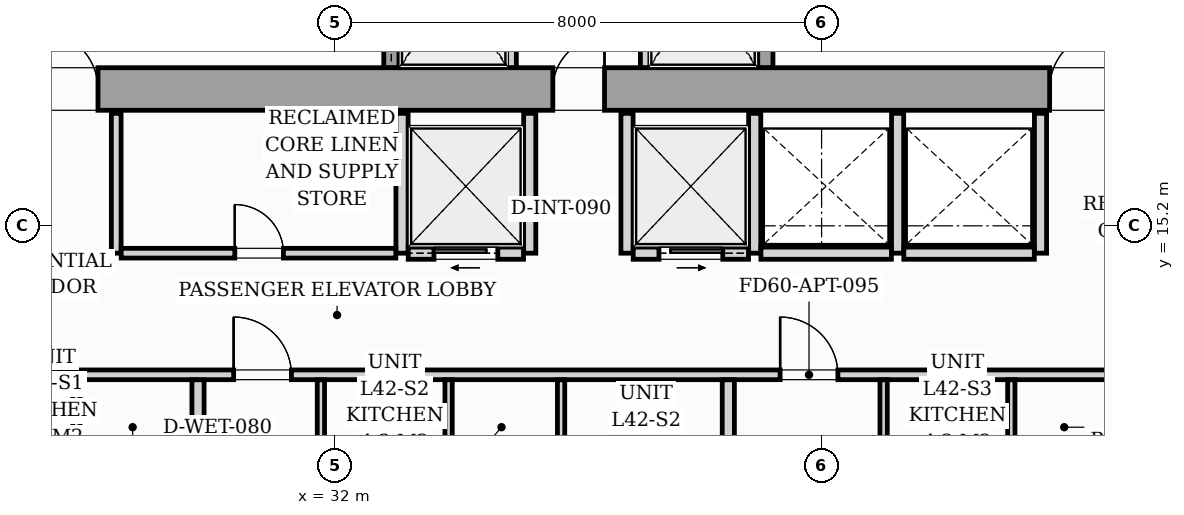
"""IFC4 building model, lengths in metres.
Left out: names, types, materials, properties, quantities, classifications, styles, units other than length and angle.
Written with IfcOpenShell. Run it as: python <this file> out.ifc"""

import sys

from ifc_helpers import new_model, si_unit, direction, frame, frame_2d, origin, origin_2d, place, context, subcontext, project, spatial, rectangle, i_section, extrude, source, transform, mapped, element, fill, save


model = new_model("IFC4")
c1 = context("Model", 3, precision=1e-05, world=origin(), true_north=direction((0.0, 1.0)))
c2 = subcontext(c1, "Body", "Model", "MODEL_VIEW")
j1 = project(units=[si_unit("LENGTHUNIT", "METRE"), si_unit("PLANEANGLEUNIT", "RADIAN")], contexts=[c1])
p1 = place(None, origin())
s1 = spatial("IfcSite", under=j1, at=p1, CompositionType="ELEMENT")
p2 = place(p1, origin())
s2 = spatial("IfcBuilding", under=s1, at=p2, CompositionType="ELEMENT")
p3 = place(p2, frame((0.0, 0.0, 147.0)))
s3 = spatial("IfcBuildingStorey", under=s2, at=p3, CompositionType="ELEMENT", Elevation=147.0)
m1 = source(origin(), c2, "Body", "SweptSolid", [
    extrude(i_section(OverallWidth=0.421, OverallDepth=0.465, WebThickness=0.045, FlangeThickness=0.073, FilletRadius=0.018, at=origin_2d()), origin(), (0.0, 0.0, 1.0), 3.196),
])
for number, where, z_axis, x_axis in (
    (1, (33.12, 17.4, 0.002), (0.0, 0.0, 1.0), (1.0, 0.0, 0.0)),
    (2, (38.88, 17.4, 0.002), (0.0, 0.0, 1.0), (1.0, 0.0, 0.0)),
):
    element("IfcColumn", number, at=place(p3, frame(where, z_axis=z_axis, x_axis=x_axis)), inside=s3, PredefinedType="PILASTER", context=c2, shape_type="MappedRepresentation", body=[
        mapped(m1, transform((0.0, 0.0, 0.0), scale=1.0)),
    ])
p4 = place(p3, frame((26.1, 17.45, 0.0), z_axis=(0.0, 0.0, 1.0), x_axis=(1.0, 0.0, 0.0)))
e3 = element("IfcWall", 3, at=p4, inside=s3, PredefinedType="SHEAR", context=c2, shape_type="SweptSolid", body=[
    extrude(rectangle(XDim=19.8, YDim=0.7, at=frame_2d((9.9, 0.0))), origin(), (0.0, 0.0, 1.0), 3.2),
])
p5 = place(p4, frame((1.05, 0.0, 0.0)))
e4 = element("IfcOpeningElement", 4, at=p5, cuts=e3, PredefinedType="OPENING", context=c2, shape_type="SweptSolid", body=[
    extrude(rectangle(XDim=0.95, YDim=2.06, at=frame_2d((0.475, 1.03))), frame((0.0, 0.36, 0.0), z_axis=(0.0, -1.0, 0.0), x_axis=(1.0, 0.0, 0.0)), (0.0, 0.0, 1.0), 0.72),
])
p6 = place(p4, frame((9.48, 0.0, 0.0)))
e5 = element("IfcOpeningElement", 5, at=p6, cuts=e3, PredefinedType="OPENING", context=c2, shape_type="SweptSolid", body=[
    extrude(rectangle(XDim=0.85, YDim=2.0, at=frame_2d((0.425, 1.0))), frame((0.0, 0.36, 0.0), z_axis=(0.0, -1.0, 0.0), x_axis=(1.0, 0.0, 0.0)), (0.0, 0.0, 1.0), 0.72),
])
p7 = place(p4, frame((17.65, 0.0, 0.0)))
e6 = element("IfcOpeningElement", 6, at=p7, cuts=e3, PredefinedType="OPENING", context=c2, shape_type="SweptSolid", body=[
    extrude(rectangle(XDim=0.95, YDim=2.06, at=frame_2d((0.475, 1.03))), frame((0.0, 0.36, 0.0), z_axis=(0.0, -1.0, 0.0), x_axis=(1.0, 0.0, 0.0)), (0.0, 0.0, 1.0), 0.72),
])
p8 = place(p3, frame((32.925, 17.802, 0.0), z_axis=(0.0, 0.0, 1.0), x_axis=(0.0, 1.0, 0.0)))
e7 = element("IfcWall", 7, at=p8, inside=s3, PredefinedType="SOLIDWALL", context=c2, shape_type="SweptSolid", body=[
    extrude(rectangle(XDim=2.646, YDim=0.25, at=frame_2d((1.323, 0.0))), origin(), (0.0, 0.0, 1.0), 3.2),
])
p9 = place(p8, frame((0.598, 0.0, 0.0)))
e8 = element("IfcOpeningElement", 8, at=p9, cuts=e7, PredefinedType="OPENING", context=c2, shape_type="SweptSolid", body=[
    extrude(rectangle(XDim=1.1, YDim=2.08, at=frame_2d((0.55, 1.04))), frame((0.0, 0.135, 0.0), z_axis=(0.0, -1.0, 0.0), x_axis=(1.0, 0.0, 0.0)), (0.0, 0.0, 1.0), 0.27),
])
for number, where, z_axis, x_axis in (
    (9, (34.9, 17.802, 0.0), (0.0, 0.0, 1.0), (0.0, 1.0, 0.0)),
    (10, (37.1, 17.802, 0.0), (0.0, 0.0, 1.0), (0.0, 1.0, 0.0)),
):
    element("IfcWall", number, at=place(p3, frame(where, z_axis=z_axis, x_axis=x_axis)), inside=s3, PredefinedType="PARTITIONING", context=c2, shape_type="SweptSolid", body=[
        extrude(rectangle(XDim=2.646, YDim=0.16, at=frame_2d((1.323, 0.0))), origin(), (0.0, 0.0, 1.0), 2.94),
    ])
p10 = place(p3, frame((39.075, 17.802, 0.0), z_axis=(0.0, 0.0, 1.0), x_axis=(0.0, 1.0, 0.0)))
e11 = element("IfcWall", 11, at=p10, inside=s3, PredefinedType="SOLIDWALL", context=c2, shape_type="SweptSolid", body=[
    extrude(rectangle(XDim=2.646, YDim=0.25, at=frame_2d((1.323, 0.0))), origin(), (0.0, 0.0, 1.0), 3.2),
])
p11 = place(p10, frame((0.598, 0.0, 0.0)))
e12 = element("IfcOpeningElement", 12, at=p11, cuts=e11, PredefinedType="OPENING", context=c2, shape_type="SweptSolid", body=[
    extrude(rectangle(XDim=1.1, YDim=2.08, at=frame_2d((0.55, 1.04))), frame((0.0, 0.135, 0.0), z_axis=(0.0, -1.0, 0.0), x_axis=(1.0, 0.0, 0.0)), (0.0, 0.0, 1.0), 0.27),
])
p12 = place(p3, frame((28.4, 14.75, 0.0), z_axis=(0.0, 0.0, 1.0), x_axis=(0.0, 1.0, 0.0)))
e13 = element("IfcWall", 13, at=p12, inside=s3, PredefinedType="PARTITIONING", context=c2, shape_type="SweptSolid", body=[
    extrude(rectangle(XDim=2.3, YDim=0.16, at=frame_2d((1.15, 0.0))), origin(), (0.0, 0.0, 1.0), 2.94),
])
p13 = place(p3, frame((33.1, 14.75, 0.0), z_axis=(0.0, 0.0, 1.0), x_axis=(0.0, 1.0, 0.0)))
e14 = element("IfcWall", 14, at=p13, inside=s3, PredefinedType="PARTITIONING", context=c2, shape_type="SweptSolid", body=[
    extrude(rectangle(XDim=2.3, YDim=0.2, at=frame_2d((1.15, 0.0))), origin(), (0.0, 0.0, 1.0), 2.94),
])
p14 = place(p3, frame((28.482, 14.75, 0.0), z_axis=(0.0, 0.0, 1.0), x_axis=(1.0, 0.0, 0.0)))
e15 = element("IfcWall", 15, at=p14, inside=s3, PredefinedType="PARTITIONING", context=c2, shape_type="SweptSolid", body=[
    extrude(rectangle(XDim=4.516, YDim=0.16, at=frame_2d((2.258, 0.0))), origin(), (0.0, 0.0, 1.0), 2.94),
])
p15 = place(p14, frame((1.868, 0.0, 0.0)))
e16 = element("IfcOpeningElement", 16, at=p15, cuts=e15, PredefinedType="OPENING", context=c2, shape_type="SweptSolid", body=[
    extrude(rectangle(XDim=0.8, YDim=2.05, at=frame_2d((0.4, 1.025))), frame((0.0, 0.09, 0.0), z_axis=(0.0, -1.0, 0.0), x_axis=(1.0, 0.0, 0.0)), (0.0, 0.0, 1.0), 0.18),
])
p16 = place(p3, frame((35.2, 14.75, 0.0), z_axis=(0.0, 0.0, 1.0), x_axis=(0.0, 1.0, 0.0)))
e17 = element("IfcWall", 17, at=p16, inside=s3, PredefinedType="PARTITIONING", context=c2, shape_type="SweptSolid", body=[
    extrude(rectangle(XDim=2.3, YDim=0.2, at=frame_2d((1.15, 0.0))), origin(), (0.0, 0.0, 1.0), 2.94),
])
p17 = place(p3, frame((33.202, 14.75, 0.0), z_axis=(0.0, 0.0, 1.0), x_axis=(1.0, 0.0, 0.0)))
e18 = element("IfcWall", 18, at=p17, inside=s3, PredefinedType="PARTITIONING", context=c2, shape_type="SweptSolid", body=[
    extrude(rectangle(XDim=1.896, YDim=0.2, at=frame_2d((0.948, 0.0))), origin(), (0.0, 0.0, 1.0), 2.94),
])
p18 = place(p17, frame((0.423, 0.0, 0.0)))
e19 = element("IfcOpeningElement", 19, at=p18, cuts=e18, PredefinedType="OPENING", context=c2, shape_type="SweptSolid", body=[
    extrude(rectangle(XDim=1.05, YDim=2.08, at=frame_2d((0.525, 1.04))), frame((0.0, 0.11, 0.0), z_axis=(0.0, -1.0, 0.0), x_axis=(1.0, 0.0, 0.0)), (0.0, 0.0, 1.0), 0.22),
])
for number, where, z_axis, x_axis in (
    (20, (36.8, 14.75, 0.0), (0.0, 0.0, 1.0), (0.0, 1.0, 0.0)),
    (21, (38.9, 14.75, 0.0), (0.0, 0.0, 1.0), (0.0, 1.0, 0.0)),
):
    element("IfcWall", number, at=place(p3, frame(where, z_axis=z_axis, x_axis=x_axis)), inside=s3, PredefinedType="PARTITIONING", context=c2, shape_type="SweptSolid", body=[
        extrude(rectangle(XDim=2.3, YDim=0.2, at=frame_2d((1.15, 0.0))), origin(), (0.0, 0.0, 1.0), 2.94),
    ])
p19 = place(p3, frame((36.902, 14.75, 0.0), z_axis=(0.0, 0.0, 1.0), x_axis=(1.0, 0.0, 0.0)))
e22 = element("IfcWall", 22, at=p19, inside=s3, PredefinedType="PARTITIONING", context=c2, shape_type="SweptSolid", body=[
    extrude(rectangle(XDim=1.896, YDim=0.2, at=frame_2d((0.948, 0.0))), origin(), (0.0, 0.0, 1.0), 2.94),
])
p20 = place(p19, frame((0.423, 0.0, 0.0)))
e23 = element("IfcOpeningElement", 23, at=p20, cuts=e22, PredefinedType="OPENING", context=c2, shape_type="SweptSolid", body=[
    extrude(rectangle(XDim=1.05, YDim=2.08, at=frame_2d((0.525, 1.04))), frame((0.0, 0.11, 0.0), z_axis=(0.0, -1.0, 0.0), x_axis=(1.0, 0.0, 0.0)), (0.0, 0.0, 1.0), 0.22),
])
for number, where, z_axis, x_axis in (
    (24, (41.25, 14.75, 0.0), (0.0, 0.0, 1.0), (0.0, 1.0, 0.0)),
    (25, (43.6, 14.75, 0.0), (0.0, 0.0, 1.0), (0.0, 1.0, 0.0)),
):
    element("IfcWall", number, at=place(p3, frame(where, z_axis=z_axis, x_axis=x_axis)), inside=s3, PredefinedType="PARTITIONING", context=c2, shape_type="SweptSolid", body=[
        extrude(rectangle(XDim=2.3, YDim=0.2, at=frame_2d((1.15, 0.0))), origin(), (0.0, 0.0, 1.0), 2.94),
    ])
for number, where, z_axis, x_axis in (
    (26, (39.002, 14.75, 0.0), (0.0, 0.0, 1.0), (1.0, 0.0, 0.0)),
    (27, (41.352, 14.75, 0.0), (0.0, 0.0, 1.0), (1.0, 0.0, 0.0)),
):
    element("IfcWall", number, at=place(p3, frame(where, z_axis=z_axis, x_axis=x_axis)), inside=s3, PredefinedType="PARTITIONING", context=c2, shape_type="SweptSolid", body=[
        extrude(rectangle(XDim=2.146, YDim=0.2, at=frame_2d((1.073, 0.0))), origin(), (0.0, 0.0, 1.0), 2.94),
    ])
p21 = place(p3, frame((22.05, 12.75, 0.0), z_axis=(0.0, 0.0, 1.0), x_axis=(1.0, 0.0, 0.0)))
e28 = element("IfcWall", 28, at=p21, inside=s3, PredefinedType="PARTITIONING", context=c2, shape_type="SweptSolid", body=[
    extrude(rectangle(XDim=25.65, YDim=0.16, at=frame_2d((12.825, 0.0))), origin(), (0.0, 0.0, 1.0), 2.94),
])
p22 = place(p21, frame((1.312, 0.0, 0.0)))
e29 = element("IfcOpeningElement", 29, at=p22, cuts=e28, PredefinedType="OPENING", context=c2, shape_type="SweptSolid", body=[
    extrude(rectangle(XDim=0.95, YDim=2.06, at=frame_2d((0.475, 1.03))), frame((0.0, 0.09, 0.0), z_axis=(0.0, -1.0, 0.0), x_axis=(1.0, 0.0, 0.0)), (0.0, 0.0, 1.0), 0.18),
])
p23 = place(p21, frame((8.281, 0.0, 0.0)))
e30 = element("IfcOpeningElement", 30, at=p23, cuts=e28, PredefinedType="OPENING", context=c2, shape_type="SweptSolid", body=[
    extrude(rectangle(XDim=0.95, YDim=2.06, at=frame_2d((0.475, 1.03))), frame((0.0, 0.09, 0.0), z_axis=(0.0, -1.0, 0.0), x_axis=(1.0, 0.0, 0.0)), (0.0, 0.0, 1.0), 0.18),
])
p24 = place(p21, frame((17.268, 0.0, 0.0)))
e31 = element("IfcOpeningElement", 31, at=p24, cuts=e28, PredefinedType="OPENING", context=c2, shape_type="SweptSolid", body=[
    extrude(rectangle(XDim=0.95, YDim=2.06, at=frame_2d((0.475, 1.03))), frame((0.0, 0.09, 0.0), z_axis=(0.0, -1.0, 0.0), x_axis=(1.0, 0.0, 0.0)), (0.0, 0.0, 1.0), 0.18),
])
p25 = place(p3, frame((27.745, 10.562, 0.0), z_axis=(0.0, 0.0, 1.0), x_axis=(0.0, 1.0, 0.0)))
e32 = element("IfcWall", 32, at=p25, inside=s3, PredefinedType="PARTITIONING", context=c2, shape_type="SweptSolid", body=[
    extrude(rectangle(XDim=2.106, YDim=0.12, at=frame_2d((1.053, 0.0))), origin(), (0.0, 0.0, 1.0), 2.94),
])
p26 = place(p3, frame((29.745, 10.562, 0.0), z_axis=(0.0, 0.0, 1.0), x_axis=(0.0, 1.0, 0.0)))
e33 = element("IfcWall", 33, at=p26, inside=s3, PredefinedType="PARTITIONING", context=c2, shape_type="SweptSolid", body=[
    extrude(rectangle(XDim=2.106, YDim=0.2, at=frame_2d((1.053, 0.0))), origin(), (0.0, 0.0, 1.0), 2.94),
])
p27 = place(p3, frame((35.716, 6.754, 0.0), z_axis=(0.0, 0.0, 1.0), x_axis=(0.0, 1.0, 0.0)))
e34 = element("IfcWall", 34, at=p27, inside=s3, PredefinedType="PARTITIONING", context=c2, shape_type="SweptSolid", body=[
    extrude(rectangle(XDim=5.914, YDim=0.12, at=frame_2d((2.957, 0.0))), origin(), (0.0, 0.0, 1.0), 2.94),
])
p28 = place(p27, frame((2.646, 0.0, 0.0)))
e35 = element("IfcOpeningElement", 35, at=p28, cuts=e34, PredefinedType="OPENING", context=c2, shape_type="SweptSolid", body=[
    extrude(rectangle(XDim=0.9, YDim=2.05, at=frame_2d((0.45, 1.025))), frame((0.0, 0.07, 0.0), z_axis=(0.0, -1.0, 0.0), x_axis=(1.0, 0.0, 0.0)), (0.0, 0.0, 1.0), 0.14),
])
for number, where, z_axis, x_axis in (
    (36, (33.866, 10.562, 0.0), (0.0, 0.0, 1.0), (0.0, 1.0, 0.0)),
    (37, (31.766, 10.562, 0.0), (0.0, 0.0, 1.0), (0.0, 1.0, 0.0)),
):
    element("IfcWall", number, at=place(p3, frame(where, z_axis=z_axis, x_axis=x_axis)), inside=s3, PredefinedType="PARTITIONING", context=c2, shape_type="SweptSolid", body=[
        extrude(rectangle(XDim=2.106, YDim=0.12, at=frame_2d((1.053, 0.0))), origin(), (0.0, 0.0, 1.0), 2.94),
    ])
p29 = place(p3, frame((38.466, 6.49, 0.0), z_axis=(0.0, 0.0, 1.0), x_axis=(0.0, 1.0, 0.0)))
e38 = element("IfcWall", 38, at=p29, inside=s3, PredefinedType="PARTITIONING", context=c2, shape_type="SweptSolid", body=[
    extrude(rectangle(XDim=6.178, YDim=0.2, at=frame_2d((3.089, 0.0))), origin(), (0.0, 0.0, 1.0), 2.94),
])
for number, where, z_axis, x_axis in (
    (39, (43.12, 10.562, 0.0), (0.0, 0.0, 1.0), (0.0, 1.0, 0.0)),
    (40, (41.02, 10.562, 0.0), (0.0, 0.0, 1.0), (0.0, 1.0, 0.0)),
):
    element("IfcWall", number, at=place(p3, frame(where, z_axis=z_axis, x_axis=x_axis)), inside=s3, PredefinedType="PARTITIONING", context=c2, shape_type="SweptSolid", body=[
        extrude(rectangle(XDim=2.106, YDim=0.12, at=frame_2d((1.053, 0.0))), origin(), (0.0, 0.0, 1.0), 2.94),
    ])
m2 = source(origin(), c2, "Body", "SweptSolid", [
    extrude(rectangle(XDim=0.95, YDim=2.06, at=frame_2d((0.475, 1.03))), frame((0.0, 0.025, 0.0), z_axis=(0.0, -1.0, 0.0), x_axis=(1.0, 0.0, 0.0)), (0.0, 0.0, 1.0), 0.05),
])
p30 = place(p5, origin())
e41 = element("IfcDoor", 41, at=p30, inside=s3, OperationType="SINGLE_SWING_LEFT", PredefinedType="DOOR", context=c2, shape_type="MappedRepresentation", body=[
    mapped(m2, transform((0.0, 0.0, 0.0), scale=1.0)),
])
fill(e4, e41)
m3 = source(origin(), c2, "Body", "SweptSolid", [
    extrude(rectangle(XDim=0.85, YDim=2.0, at=frame_2d((0.425, 1.0))), frame((0.0, 0.025, 0.0), z_axis=(0.0, -1.0, 0.0), x_axis=(1.0, 0.0, 0.0)), (0.0, 0.0, 1.0), 0.05),
])
p31 = place(p6, origin())
e42 = element("IfcDoor", 42, at=p31, inside=s3, OperationType="SINGLE_SWING_RIGHT", PredefinedType="DOOR", context=c2, shape_type="MappedRepresentation", body=[
    mapped(m3, transform((0.0, 0.0, 0.0), scale=1.0)),
])
fill(e5, e42)
p32 = place(p7, origin())
e43 = element("IfcDoor", 43, at=p32, inside=s3, OperationType="SINGLE_SWING_RIGHT", PredefinedType="DOOR", context=c2, shape_type="MappedRepresentation", body=[
    mapped(m2, transform((0.0, 0.0, 0.0), scale=1.0)),
])
fill(e6, e43)
m4 = source(origin(), c2, "Body", "SweptSolid", [
    extrude(rectangle(XDim=0.8, YDim=2.05, at=frame_2d((0.4, 1.025))), frame((0.0, 0.025, 0.0), z_axis=(0.0, -1.0, 0.0), x_axis=(1.0, 0.0, 0.0)), (0.0, 0.0, 1.0), 0.05),
])
p33 = place(p15, origin())
e44 = element("IfcDoor", 44, at=p33, inside=s3, OperationType="SINGLE_SWING_LEFT", PredefinedType="DOOR", context=c2, shape_type="MappedRepresentation", body=[
    mapped(m4, transform((0.0, 0.0, 0.0), scale=1.0)),
])
fill(e16, e44)
m5 = source(origin(), c2, "Body", "SweptSolid", [
    extrude(rectangle(XDim=1.05, YDim=2.08, at=frame_2d((0.525, 1.04))), frame((0.0, 0.025, 0.0), z_axis=(0.0, -1.0, 0.0), x_axis=(1.0, 0.0, 0.0)), (0.0, 0.0, 1.0), 0.05),
])
p34 = place(p18, origin())
e45 = element("IfcDoor", 45, at=p34, inside=s3, OperationType="SLIDING_TO_LEFT", PredefinedType="DOOR", context=c2, shape_type="MappedRepresentation", body=[
    mapped(m5, transform((0.0, 0.0, 0.0), scale=1.0)),
])
fill(e19, e45)
p35 = place(p20, origin())
e46 = element("IfcDoor", 46, at=p35, inside=s3, OperationType="SLIDING_TO_RIGHT", PredefinedType="DOOR", context=c2, shape_type="MappedRepresentation", body=[
    mapped(m5, transform((0.0, 0.0, 0.0), scale=1.0)),
])
fill(e23, e46)
m6 = source(origin(), c2, "Body", "SweptSolid", [
    extrude(rectangle(XDim=0.95, YDim=2.06, at=frame_2d((0.475, 1.03))), frame((0.0, 0.025, 0.0), z_axis=(0.0, -1.0, 0.0), x_axis=(1.0, 0.0, 0.0)), (0.0, 0.0, 1.0), 0.05),
])
p36 = place(p23, origin())
e47 = element("IfcDoor", 47, at=p36, inside=s3, OperationType="SINGLE_SWING_LEFT", PredefinedType="DOOR", context=c2, shape_type="MappedRepresentation", body=[
    mapped(m6, transform((0.0, 0.0, 0.0), scale=1.0)),
])
fill(e30, e47)
p37 = place(p24, origin())
e48 = element("IfcDoor", 48, at=p37, inside=s3, OperationType="SINGLE_SWING_LEFT", PredefinedType="DOOR", context=c2, shape_type="MappedRepresentation", body=[
    mapped(m6, transform((0.0, 0.0, 0.0), scale=1.0)),
])
fill(e31, e48)
save(model, sys.argv[1])
